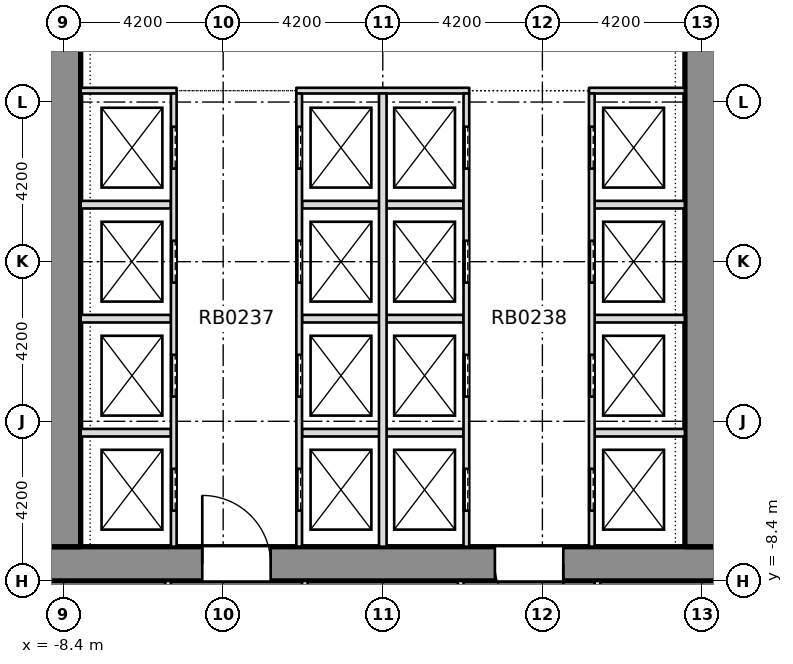
"""IFC4 building model, lengths in metres.
Left out: names, types, materials, properties, quantities, classifications, styles, units other than length and angle.
Written with IfcOpenShell. Run it as: python <this file> out.ifc"""

import sys

from ifc_helpers import new_model, si_unit, direction, frame, frame_2d, origin, place, context, subcontext, project, spatial, rectangle, extrude, element, fill, save


model = new_model("IFC4")
c1 = context("Model", 3, precision=1e-05, world=origin(), true_north=direction((0.0, 1.0)))
c2 = subcontext(c1, "Body", "Model", "MODEL_VIEW")
j1 = project(units=[si_unit("LENGTHUNIT", "METRE"), si_unit("PLANEANGLEUNIT", "RADIAN")], contexts=[c1])
p1 = place(None, origin())
s1 = spatial("IfcSite", under=j1, at=p1, CompositionType="ELEMENT")
p2 = place(p1, origin())
s2 = spatial("IfcBuilding", under=s1, at=p2, CompositionType="ELEMENT")
p3 = place(p2, frame((0.0, 0.0, -8.4)))
s3 = spatial("IfcBuildingStorey", under=s2, at=p3, CompositionType="ELEMENT", Elevation=-8.4)
p4 = place(p3, frame((-11.7, -7.95, 0.0), z_axis=(0.0, 0.0, 1.0), x_axis=(1.0, 0.0, 0.0)))
e1 = element("IfcWall", 1, at=p4, inside=s3, PredefinedType="SHEAR", context=c2, shape_type="SweptSolid", body=[
    extrude(rectangle(XDim=23.4, YDim=0.9, at=frame_2d((11.7, 0.0))), origin(), (0.0, 0.0, 1.0), 3.85),
])
p5 = place(p4, frame((6.95, 0.0, 0.0)))
e2 = element("IfcOpeningElement", 2, at=p5, cuts=e1, PredefinedType="OPENING", context=c2, shape_type="SweptSolid", body=[
    extrude(rectangle(XDim=1.8, YDim=2.1, at=frame_2d((0.9, 1.05))), frame((0.0, 0.46, 0.0), z_axis=(0.0, -1.0, 0.0), x_axis=(1.0, 0.0, 0.0)), (0.0, 0.0, 1.0), 0.92),
])
p6 = place(p4, frame((14.65, 0.0, 0.0)))
e3 = element("IfcOpeningElement", 3, at=p6, cuts=e1, PredefinedType="OPENING", context=c2, shape_type="SweptSolid", body=[
    extrude(rectangle(XDim=1.8, YDim=2.1, at=frame_2d((0.9, 1.05))), frame((0.0, 0.46, 0.0), z_axis=(0.0, -1.0, 0.0), x_axis=(1.0, 0.0, 0.0)), (0.0, 0.0, 1.0), 0.92),
])
p7 = place(p3, frame((-8.4, -7.5, 0.0), z_axis=(0.0, 0.0, 1.0), x_axis=(0.0, 1.0, 0.0)))
e4 = element("IfcWall", 4, at=p7, inside=s3, PredefinedType="SHEAR", context=c2, shape_type="SweptSolid", body=[
    extrude(rectangle(XDim=28.35, YDim=0.9, at=frame_2d((14.175, 0.0))), origin(), (0.0, 0.0, 1.0), 3.85),
])
p8 = place(p7, frame((18.4, 0.0, 0.0)))
e5 = element("IfcOpeningElement", 5, at=p8, cuts=e4, PredefinedType="OPENING", context=c2, shape_type="SweptSolid", body=[
    extrude(rectangle(XDim=1.2, YDim=2.1, at=frame_2d((0.6, 1.05))), frame((0.0, 0.46, 0.0), z_axis=(0.0, -1.0, 0.0), x_axis=(1.0, 0.0, 0.0)), (0.0, 0.0, 1.0), 0.92),
])
p9 = place(p3, frame((8.4, -7.5, 0.0), z_axis=(0.0, 0.0, 1.0), x_axis=(0.0, 1.0, 0.0)))
e6 = element("IfcWall", 6, at=p9, inside=s3, PredefinedType="SHEAR", context=c2, shape_type="SweptSolid", body=[
    extrude(rectangle(XDim=28.35, YDim=0.9, at=frame_2d((14.175, 0.0))), origin(), (0.0, 0.0, 1.0), 3.85),
])
p10 = place(p9, frame((18.4, 0.0, 0.0)))
e7 = element("IfcOpeningElement", 7, at=p10, cuts=e6, PredefinedType="OPENING", context=c2, shape_type="SweptSolid", body=[
    extrude(rectangle(XDim=1.2, YDim=2.1, at=frame_2d((0.6, 1.05))), frame((0.0, 0.46, 0.0), z_axis=(0.0, -1.0, 0.0), x_axis=(1.0, 0.0, 0.0)), (0.0, 0.0, 1.0), 0.92),
])
for number, where, z_axis, x_axis in (
    (8, (-5.65, -13.325, 0.0), (0.0, 0.0, 1.0), (0.0, 1.0, 0.0)),
    (9, (-2.05, -13.325, 0.0), (0.0, 0.0, 1.0), (0.0, 1.0, 0.0)),
    (10, (2.05, -13.325, 0.0), (0.0, 0.0, 1.0), (0.0, 1.0, 0.0)),
    (11, (5.65, -13.325, 0.0), (0.0, 0.0, 1.0), (0.0, 1.0, 0.0)),
):
    element("IfcWall", number, at=place(p3, frame(where, z_axis=z_axis, x_axis=x_axis)), inside=s3, PredefinedType="PARTITIONING", context=c2, shape_type="SweptSolid", body=[
        extrude(rectangle(XDim=4.924, YDim=0.15, at=frame_2d((2.462, 0.0))), origin(), (0.0, 0.0, 1.0), 3.85),
    ])
p11 = place(p3, frame((-7.949, -4.5, 0.0), z_axis=(0.0, 0.0, 1.0), x_axis=(1.0, 0.0, 0.0)))
e12 = element("IfcWall", 12, at=p11, inside=s3, PredefinedType="PARTITIONING", context=c2, shape_type="SweptSolid", body=[
    extrude(rectangle(XDim=2.374, YDim=0.2, at=frame_2d((1.187, 0.0))), origin(), (0.0, 0.0, 1.0), 3.85),
])
p12 = place(p3, frame((-2.125, -4.5, 0.0), z_axis=(0.0, 0.0, 1.0), x_axis=(1.0, 0.0, 0.0)))
e13 = element("IfcWall", 13, at=p12, inside=s3, PredefinedType="PARTITIONING", context=c2, shape_type="SweptSolid", body=[
    extrude(rectangle(XDim=4.25, YDim=0.2, at=frame_2d((2.125, 0.0))), origin(), (0.0, 0.0, 1.0), 3.85),
])
for number, where, z_axis, x_axis in (
    (14, (5.575, -4.5, 0.0), (0.0, 0.0, 1.0), (1.0, 0.0, 0.0)),
    (15, (-7.949, -1.5, 0.0), (0.0, 0.0, 1.0), (1.0, 0.0, 0.0)),
):
    element("IfcWall", number, at=place(p3, frame(where, z_axis=z_axis, x_axis=x_axis)), inside=s3, PredefinedType="PARTITIONING", context=c2, shape_type="SweptSolid", body=[
        extrude(rectangle(XDim=2.374, YDim=0.2, at=frame_2d((1.187, 0.0))), origin(), (0.0, 0.0, 1.0), 3.85),
    ])
p13 = place(p3, frame((-2.125, -1.5, 0.0), z_axis=(0.0, 0.0, 1.0), x_axis=(1.0, 0.0, 0.0)))
e16 = element("IfcWall", 16, at=p13, inside=s3, PredefinedType="PARTITIONING", context=c2, shape_type="SweptSolid", body=[
    extrude(rectangle(XDim=4.25, YDim=0.2, at=frame_2d((2.125, 0.0))), origin(), (0.0, 0.0, 1.0), 3.85),
])
for number, where, z_axis, x_axis in (
    (17, (5.575, -1.5, 0.0), (0.0, 0.0, 1.0), (1.0, 0.0, 0.0)),
    (18, (-7.949, 1.5, 0.0), (0.0, 0.0, 1.0), (1.0, 0.0, 0.0)),
):
    element("IfcWall", number, at=place(p3, frame(where, z_axis=z_axis, x_axis=x_axis)), inside=s3, PredefinedType="PARTITIONING", context=c2, shape_type="SweptSolid", body=[
        extrude(rectangle(XDim=2.374, YDim=0.2, at=frame_2d((1.187, 0.0))), origin(), (0.0, 0.0, 1.0), 3.85),
    ])
p14 = place(p3, frame((-2.125, 1.5, 0.0), z_axis=(0.0, 0.0, 1.0), x_axis=(1.0, 0.0, 0.0)))
e19 = element("IfcWall", 19, at=p14, inside=s3, PredefinedType="PARTITIONING", context=c2, shape_type="SweptSolid", body=[
    extrude(rectangle(XDim=4.25, YDim=0.2, at=frame_2d((2.125, 0.0))), origin(), (0.0, 0.0, 1.0), 3.85),
])
p15 = place(p3, frame((5.575, 1.5, 0.0), z_axis=(0.0, 0.0, 1.0), x_axis=(1.0, 0.0, 0.0)))
e20 = element("IfcWall", 20, at=p15, inside=s3, PredefinedType="PARTITIONING", context=c2, shape_type="SweptSolid", body=[
    extrude(rectangle(XDim=2.374, YDim=0.2, at=frame_2d((1.187, 0.0))), origin(), (0.0, 0.0, 1.0), 3.85),
])
p16 = place(p3, frame((-7.949, 4.5, 0.0), z_axis=(0.0, 0.0, 1.0), x_axis=(1.0, 0.0, 0.0)))
e21 = element("IfcWall", 21, at=p16, inside=s3, PredefinedType="PARTITIONING", context=c2, shape_type="SweptSolid", body=[
    extrude(rectangle(XDim=2.524, YDim=0.15, at=frame_2d((1.262, 0.0))), origin(), (0.0, 0.0, 1.0), 3.85),
])
p17 = place(p3, frame((-2.275, 4.5, 0.0), z_axis=(0.0, 0.0, 1.0), x_axis=(1.0, 0.0, 0.0)))
e22 = element("IfcWall", 22, at=p17, inside=s3, PredefinedType="PARTITIONING", context=c2, shape_type="SweptSolid", body=[
    extrude(rectangle(XDim=4.55, YDim=0.15, at=frame_2d((2.275, 0.0))), origin(), (0.0, 0.0, 1.0), 3.85),
])
p18 = place(p3, frame((5.425, 4.5, 0.0), z_axis=(0.0, 0.0, 1.0), x_axis=(1.0, 0.0, 0.0)))
e23 = element("IfcWall", 23, at=p18, inside=s3, PredefinedType="PARTITIONING", context=c2, shape_type="SweptSolid", body=[
    extrude(rectangle(XDim=2.524, YDim=0.15, at=frame_2d((1.262, 0.0))), origin(), (0.0, 0.0, 1.0), 3.85),
])
p19 = place(p3, frame((-5.5, -7.499, 0.0), z_axis=(0.0, 0.0, 1.0), x_axis=(0.0, 1.0, 0.0)))
e24 = element("IfcWall", 24, at=p19, inside=s3, PredefinedType="PARTITIONING", context=c2, shape_type="SweptSolid", body=[
    extrude(rectangle(XDim=11.924, YDim=0.15, at=frame_2d((5.962, 0.0))), origin(), (0.0, 0.0, 1.0), 3.85),
])
p20 = place(p19, frame((0.949, 0.0, 0.0)))
e25 = element("IfcOpeningElement", 25, at=p20, cuts=e24, PredefinedType="OPENING", context=c2, shape_type="SweptSolid", body=[
    extrude(rectangle(XDim=1.1, YDim=2.1, at=frame_2d((0.55, 1.05))), frame((0.0, 0.085, 0.0), z_axis=(0.0, -1.0, 0.0), x_axis=(1.0, 0.0, 0.0)), (0.0, 0.0, 1.0), 0.17),
])
p21 = place(p19, frame((3.949, 0.0, 0.0)))
e26 = element("IfcOpeningElement", 26, at=p21, cuts=e24, PredefinedType="OPENING", context=c2, shape_type="SweptSolid", body=[
    extrude(rectangle(XDim=1.1, YDim=2.1, at=frame_2d((0.55, 1.05))), frame((0.0, 0.085, 0.0), z_axis=(0.0, -1.0, 0.0), x_axis=(1.0, 0.0, 0.0)), (0.0, 0.0, 1.0), 0.17),
])
p22 = place(p19, frame((6.949, 0.0, 0.0)))
e27 = element("IfcOpeningElement", 27, at=p22, cuts=e24, PredefinedType="OPENING", context=c2, shape_type="SweptSolid", body=[
    extrude(rectangle(XDim=1.1, YDim=2.1, at=frame_2d((0.55, 1.05))), frame((0.0, 0.085, 0.0), z_axis=(0.0, -1.0, 0.0), x_axis=(1.0, 0.0, 0.0)), (0.0, 0.0, 1.0), 0.17),
])
p23 = place(p19, frame((9.949, 0.0, 0.0)))
e28 = element("IfcOpeningElement", 28, at=p23, cuts=e24, PredefinedType="OPENING", context=c2, shape_type="SweptSolid", body=[
    extrude(rectangle(XDim=1.1, YDim=2.1, at=frame_2d((0.55, 1.05))), frame((0.0, 0.085, 0.0), z_axis=(0.0, -1.0, 0.0), x_axis=(1.0, 0.0, 0.0)), (0.0, 0.0, 1.0), 0.17),
])
p24 = place(p3, frame((-2.2, -7.499, 0.0), z_axis=(0.0, 0.0, 1.0), x_axis=(0.0, 1.0, 0.0)))
e29 = element("IfcWall", 29, at=p24, inside=s3, PredefinedType="PARTITIONING", context=c2, shape_type="SweptSolid", body=[
    extrude(rectangle(XDim=11.924, YDim=0.15, at=frame_2d((5.962, 0.0))), origin(), (0.0, 0.0, 1.0), 3.85),
])
p25 = place(p24, frame((0.949, 0.0, 0.0)))
e30 = element("IfcOpeningElement", 30, at=p25, cuts=e29, PredefinedType="OPENING", context=c2, shape_type="SweptSolid", body=[
    extrude(rectangle(XDim=1.1, YDim=2.1, at=frame_2d((0.55, 1.05))), frame((0.0, 0.085, 0.0), z_axis=(0.0, -1.0, 0.0), x_axis=(1.0, 0.0, 0.0)), (0.0, 0.0, 1.0), 0.17),
])
p26 = place(p24, frame((3.949, 0.0, 0.0)))
e31 = element("IfcOpeningElement", 31, at=p26, cuts=e29, PredefinedType="OPENING", context=c2, shape_type="SweptSolid", body=[
    extrude(rectangle(XDim=1.1, YDim=2.1, at=frame_2d((0.55, 1.05))), frame((0.0, 0.085, 0.0), z_axis=(0.0, -1.0, 0.0), x_axis=(1.0, 0.0, 0.0)), (0.0, 0.0, 1.0), 0.17),
])
p27 = place(p24, frame((6.949, 0.0, 0.0)))
e32 = element("IfcOpeningElement", 32, at=p27, cuts=e29, PredefinedType="OPENING", context=c2, shape_type="SweptSolid", body=[
    extrude(rectangle(XDim=1.1, YDim=2.1, at=frame_2d((0.55, 1.05))), frame((0.0, 0.085, 0.0), z_axis=(0.0, -1.0, 0.0), x_axis=(1.0, 0.0, 0.0)), (0.0, 0.0, 1.0), 0.17),
])
p28 = place(p24, frame((9.949, 0.0, 0.0)))
e33 = element("IfcOpeningElement", 33, at=p28, cuts=e29, PredefinedType="OPENING", context=c2, shape_type="SweptSolid", body=[
    extrude(rectangle(XDim=1.1, YDim=2.1, at=frame_2d((0.55, 1.05))), frame((0.0, 0.085, 0.0), z_axis=(0.0, -1.0, 0.0), x_axis=(1.0, 0.0, 0.0)), (0.0, 0.0, 1.0), 0.17),
])
p29 = place(p3, frame((0.0, -7.499, 0.0), z_axis=(0.0, 0.0, 1.0), x_axis=(0.0, 1.0, 0.0)))
e34 = element("IfcWall", 34, at=p29, inside=s3, PredefinedType="PARTITIONING", context=c2, shape_type="SweptSolid", body=[
    extrude(rectangle(XDim=11.924, YDim=0.2, at=frame_2d((5.962, 0.0))), origin(), (0.0, 0.0, 1.0), 3.85),
])
p30 = place(p3, frame((2.2, -7.499, 0.0), z_axis=(0.0, 0.0, 1.0), x_axis=(0.0, 1.0, 0.0)))
e35 = element("IfcWall", 35, at=p30, inside=s3, PredefinedType="PARTITIONING", context=c2, shape_type="SweptSolid", body=[
    extrude(rectangle(XDim=11.924, YDim=0.15, at=frame_2d((5.962, 0.0))), origin(), (0.0, 0.0, 1.0), 3.85),
])
p31 = place(p30, frame((0.949, 0.0, 0.0)))
e36 = element("IfcOpeningElement", 36, at=p31, cuts=e35, PredefinedType="OPENING", context=c2, shape_type="SweptSolid", body=[
    extrude(rectangle(XDim=1.1, YDim=2.1, at=frame_2d((0.55, 1.05))), frame((0.0, 0.085, 0.0), z_axis=(0.0, -1.0, 0.0), x_axis=(1.0, 0.0, 0.0)), (0.0, 0.0, 1.0), 0.17),
])
p32 = place(p30, frame((3.949, 0.0, 0.0)))
e37 = element("IfcOpeningElement", 37, at=p32, cuts=e35, PredefinedType="OPENING", context=c2, shape_type="SweptSolid", body=[
    extrude(rectangle(XDim=1.1, YDim=2.1, at=frame_2d((0.55, 1.05))), frame((0.0, 0.085, 0.0), z_axis=(0.0, -1.0, 0.0), x_axis=(1.0, 0.0, 0.0)), (0.0, 0.0, 1.0), 0.17),
])
p33 = place(p30, frame((6.949, 0.0, 0.0)))
e38 = element("IfcOpeningElement", 38, at=p33, cuts=e35, PredefinedType="OPENING", context=c2, shape_type="SweptSolid", body=[
    extrude(rectangle(XDim=1.1, YDim=2.1, at=frame_2d((0.55, 1.05))), frame((0.0, 0.085, 0.0), z_axis=(0.0, -1.0, 0.0), x_axis=(1.0, 0.0, 0.0)), (0.0, 0.0, 1.0), 0.17),
])
p34 = place(p30, frame((9.949, 0.0, 0.0)))
e39 = element("IfcOpeningElement", 39, at=p34, cuts=e35, PredefinedType="OPENING", context=c2, shape_type="SweptSolid", body=[
    extrude(rectangle(XDim=1.1, YDim=2.1, at=frame_2d((0.55, 1.05))), frame((0.0, 0.085, 0.0), z_axis=(0.0, -1.0, 0.0), x_axis=(1.0, 0.0, 0.0)), (0.0, 0.0, 1.0), 0.17),
])
p35 = place(p3, frame((5.5, -7.499, 0.0), z_axis=(0.0, 0.0, 1.0), x_axis=(0.0, 1.0, 0.0)))
e40 = element("IfcWall", 40, at=p35, inside=s3, PredefinedType="PARTITIONING", context=c2, shape_type="SweptSolid", body=[
    extrude(rectangle(XDim=11.924, YDim=0.15, at=frame_2d((5.962, 0.0))), origin(), (0.0, 0.0, 1.0), 3.85),
])
p36 = place(p35, frame((0.949, 0.0, 0.0)))
e41 = element("IfcOpeningElement", 41, at=p36, cuts=e40, PredefinedType="OPENING", context=c2, shape_type="SweptSolid", body=[
    extrude(rectangle(XDim=1.1, YDim=2.1, at=frame_2d((0.55, 1.05))), frame((0.0, 0.085, 0.0), z_axis=(0.0, -1.0, 0.0), x_axis=(1.0, 0.0, 0.0)), (0.0, 0.0, 1.0), 0.17),
])
p37 = place(p35, frame((3.949, 0.0, 0.0)))
e42 = element("IfcOpeningElement", 42, at=p37, cuts=e40, PredefinedType="OPENING", context=c2, shape_type="SweptSolid", body=[
    extrude(rectangle(XDim=1.1, YDim=2.1, at=frame_2d((0.55, 1.05))), frame((0.0, 0.085, 0.0), z_axis=(0.0, -1.0, 0.0), x_axis=(1.0, 0.0, 0.0)), (0.0, 0.0, 1.0), 0.17),
])
p38 = place(p35, frame((6.949, 0.0, 0.0)))
e43 = element("IfcOpeningElement", 43, at=p38, cuts=e40, PredefinedType="OPENING", context=c2, shape_type="SweptSolid", body=[
    extrude(rectangle(XDim=1.1, YDim=2.1, at=frame_2d((0.55, 1.05))), frame((0.0, 0.085, 0.0), z_axis=(0.0, -1.0, 0.0), x_axis=(1.0, 0.0, 0.0)), (0.0, 0.0, 1.0), 0.17),
])
p39 = place(p35, frame((9.949, 0.0, 0.0)))
e44 = element("IfcOpeningElement", 44, at=p39, cuts=e40, PredefinedType="OPENING", context=c2, shape_type="SweptSolid", body=[
    extrude(rectangle(XDim=1.1, YDim=2.1, at=frame_2d((0.55, 1.05))), frame((0.0, 0.085, 0.0), z_axis=(0.0, -1.0, 0.0), x_axis=(1.0, 0.0, 0.0)), (0.0, 0.0, 1.0), 0.17),
])
p40 = place(p20, origin())
e45 = element("IfcDoor", 45, at=p40, inside=s3, OperationType="SLIDING_TO_RIGHT", PredefinedType="DOOR", context=c2, shape_type="SweptSolid", body=[
    extrude(rectangle(XDim=1.1, YDim=2.1, at=frame_2d((0.55, 1.05))), frame((0.0, 0.025, 0.0), z_axis=(0.0, -1.0, 0.0), x_axis=(1.0, 0.0, 0.0)), (0.0, 0.0, 1.0), 0.05),
])
fill(e25, e45)
p41 = place(p21, origin())
e46 = element("IfcDoor", 46, at=p41, inside=s3, OperationType="SLIDING_TO_RIGHT", PredefinedType="DOOR", context=c2, shape_type="SweptSolid", body=[
    extrude(rectangle(XDim=1.1, YDim=2.1, at=frame_2d((0.55, 1.05))), frame((0.0, 0.025, 0.0), z_axis=(0.0, -1.0, 0.0), x_axis=(1.0, 0.0, 0.0)), (0.0, 0.0, 1.0), 0.05),
])
fill(e26, e46)
p42 = place(p22, origin())
e47 = element("IfcDoor", 47, at=p42, inside=s3, OperationType="SLIDING_TO_RIGHT", PredefinedType="DOOR", context=c2, shape_type="SweptSolid", body=[
    extrude(rectangle(XDim=1.1, YDim=2.1, at=frame_2d((0.55, 1.05))), frame((0.0, 0.025, 0.0), z_axis=(0.0, -1.0, 0.0), x_axis=(1.0, 0.0, 0.0)), (0.0, 0.0, 1.0), 0.05),
])
fill(e27, e47)
p43 = place(p23, origin())
e48 = element("IfcDoor", 48, at=p43, inside=s3, OperationType="SLIDING_TO_RIGHT", PredefinedType="DOOR", context=c2, shape_type="SweptSolid", body=[
    extrude(rectangle(XDim=1.1, YDim=2.1, at=frame_2d((0.55, 1.05))), frame((0.0, 0.025, 0.0), z_axis=(0.0, -1.0, 0.0), x_axis=(1.0, 0.0, 0.0)), (0.0, 0.0, 1.0), 0.05),
])
fill(e28, e48)
p44 = place(p25, origin())
e49 = element("IfcDoor", 49, at=p44, inside=s3, OperationType="SLIDING_TO_RIGHT", PredefinedType="DOOR", context=c2, shape_type="SweptSolid", body=[
    extrude(rectangle(XDim=1.1, YDim=2.1, at=frame_2d((0.55, 1.05))), frame((0.0, 0.025, 0.0), z_axis=(0.0, -1.0, 0.0), x_axis=(1.0, 0.0, 0.0)), (0.0, 0.0, 1.0), 0.05),
])
fill(e30, e49)
p45 = place(p26, origin())
e50 = element("IfcDoor", 50, at=p45, inside=s3, OperationType="SLIDING_TO_RIGHT", PredefinedType="DOOR", context=c2, shape_type="SweptSolid", body=[
    extrude(rectangle(XDim=1.1, YDim=2.1, at=frame_2d((0.55, 1.05))), frame((0.0, 0.025, 0.0), z_axis=(0.0, -1.0, 0.0), x_axis=(1.0, 0.0, 0.0)), (0.0, 0.0, 1.0), 0.05),
])
fill(e31, e50)
p46 = place(p27, origin())
e51 = element("IfcDoor", 51, at=p46, inside=s3, OperationType="SLIDING_TO_RIGHT", PredefinedType="DOOR", context=c2, shape_type="SweptSolid", body=[
    extrude(rectangle(XDim=1.1, YDim=2.1, at=frame_2d((0.55, 1.05))), frame((0.0, 0.025, 0.0), z_axis=(0.0, -1.0, 0.0), x_axis=(1.0, 0.0, 0.0)), (0.0, 0.0, 1.0), 0.05),
])
fill(e32, e51)
p47 = place(p28, origin())
e52 = element("IfcDoor", 52, at=p47, inside=s3, OperationType="SLIDING_TO_RIGHT", PredefinedType="DOOR", context=c2, shape_type="SweptSolid", body=[
    extrude(rectangle(XDim=1.1, YDim=2.1, at=frame_2d((0.55, 1.05))), frame((0.0, 0.025, 0.0), z_axis=(0.0, -1.0, 0.0), x_axis=(1.0, 0.0, 0.0)), (0.0, 0.0, 1.0), 0.05),
])
fill(e33, e52)
p48 = place(p31, origin())
e53 = element("IfcDoor", 53, at=p48, inside=s3, OperationType="SLIDING_TO_RIGHT", PredefinedType="DOOR", context=c2, shape_type="SweptSolid", body=[
    extrude(rectangle(XDim=1.1, YDim=2.1, at=frame_2d((0.55, 1.05))), frame((0.0, 0.025, 0.0), z_axis=(0.0, -1.0, 0.0), x_axis=(1.0, 0.0, 0.0)), (0.0, 0.0, 1.0), 0.05),
])
fill(e36, e53)
p49 = place(p32, origin())
e54 = element("IfcDoor", 54, at=p49, inside=s3, OperationType="SLIDING_TO_RIGHT", PredefinedType="DOOR", context=c2, shape_type="SweptSolid", body=[
    extrude(rectangle(XDim=1.1, YDim=2.1, at=frame_2d((0.55, 1.05))), frame((0.0, 0.025, 0.0), z_axis=(0.0, -1.0, 0.0), x_axis=(1.0, 0.0, 0.0)), (0.0, 0.0, 1.0), 0.05),
])
fill(e37, e54)
p50 = place(p33, origin())
e55 = element("IfcDoor", 55, at=p50, inside=s3, OperationType="SLIDING_TO_RIGHT", PredefinedType="DOOR", context=c2, shape_type="SweptSolid", body=[
    extrude(rectangle(XDim=1.1, YDim=2.1, at=frame_2d((0.55, 1.05))), frame((0.0, 0.025, 0.0), z_axis=(0.0, -1.0, 0.0), x_axis=(1.0, 0.0, 0.0)), (0.0, 0.0, 1.0), 0.05),
])
fill(e38, e55)
p51 = place(p34, origin())
e56 = element("IfcDoor", 56, at=p51, inside=s3, OperationType="SLIDING_TO_RIGHT", PredefinedType="DOOR", context=c2, shape_type="SweptSolid", body=[
    extrude(rectangle(XDim=1.1, YDim=2.1, at=frame_2d((0.55, 1.05))), frame((0.0, 0.025, 0.0), z_axis=(0.0, -1.0, 0.0), x_axis=(1.0, 0.0, 0.0)), (0.0, 0.0, 1.0), 0.05),
])
fill(e39, e56)
p52 = place(p36, origin())
e57 = element("IfcDoor", 57, at=p52, inside=s3, OperationType="SLIDING_TO_RIGHT", PredefinedType="DOOR", context=c2, shape_type="SweptSolid", body=[
    extrude(rectangle(XDim=1.1, YDim=2.1, at=frame_2d((0.55, 1.05))), frame((0.0, 0.025, 0.0), z_axis=(0.0, -1.0, 0.0), x_axis=(1.0, 0.0, 0.0)), (0.0, 0.0, 1.0), 0.05),
])
fill(e41, e57)
p53 = place(p37, origin())
e58 = element("IfcDoor", 58, at=p53, inside=s3, OperationType="SLIDING_TO_RIGHT", PredefinedType="DOOR", context=c2, shape_type="SweptSolid", body=[
    extrude(rectangle(XDim=1.1, YDim=2.1, at=frame_2d((0.55, 1.05))), frame((0.0, 0.025, 0.0), z_axis=(0.0, -1.0, 0.0), x_axis=(1.0, 0.0, 0.0)), (0.0, 0.0, 1.0), 0.05),
])
fill(e42, e58)
p54 = place(p38, origin())
e59 = element("IfcDoor", 59, at=p54, inside=s3, OperationType="SLIDING_TO_RIGHT", PredefinedType="DOOR", context=c2, shape_type="SweptSolid", body=[
    extrude(rectangle(XDim=1.1, YDim=2.1, at=frame_2d((0.55, 1.05))), frame((0.0, 0.025, 0.0), z_axis=(0.0, -1.0, 0.0), x_axis=(1.0, 0.0, 0.0)), (0.0, 0.0, 1.0), 0.05),
])
fill(e43, e59)
p55 = place(p39, origin())
e60 = element("IfcDoor", 60, at=p55, inside=s3, OperationType="SLIDING_TO_RIGHT", PredefinedType="DOOR", context=c2, shape_type="SweptSolid", body=[
    extrude(rectangle(XDim=1.1, YDim=2.1, at=frame_2d((0.55, 1.05))), frame((0.0, 0.025, 0.0), z_axis=(0.0, -1.0, 0.0), x_axis=(1.0, 0.0, 0.0)), (0.0, 0.0, 1.0), 0.05),
])
fill(e44, e60)
p56 = place(p5, origin())
e61 = element("IfcDoor", 61, at=p56, inside=s3, OperationType="SINGLE_SWING_LEFT", PredefinedType="DOOR", context=c2, shape_type="SweptSolid", body=[
    extrude(rectangle(XDim=1.8, YDim=2.1, at=frame_2d((0.9, 1.05))), frame((0.0, 0.025, 0.0), z_axis=(0.0, -1.0, 0.0), x_axis=(1.0, 0.0, 0.0)), (0.0, 0.0, 1.0), 0.05),
])
fill(e2, e61)
p57 = place(p6, origin())
e62 = element("IfcDoor", 62, at=p57, inside=s3, OperationType="SINGLE_SWING_LEFT", PredefinedType="DOOR", context=c2, shape_type="SweptSolid", body=[
    extrude(rectangle(XDim=1.8, YDim=2.1, at=frame_2d((0.9, 1.05))), frame((0.0, 0.025, 0.0), z_axis=(0.0, -1.0, 0.0), x_axis=(1.0, 0.0, 0.0)), (0.0, 0.0, 1.0), 0.05),
])
fill(e3, e62)
save(model, sys.argv[1])
